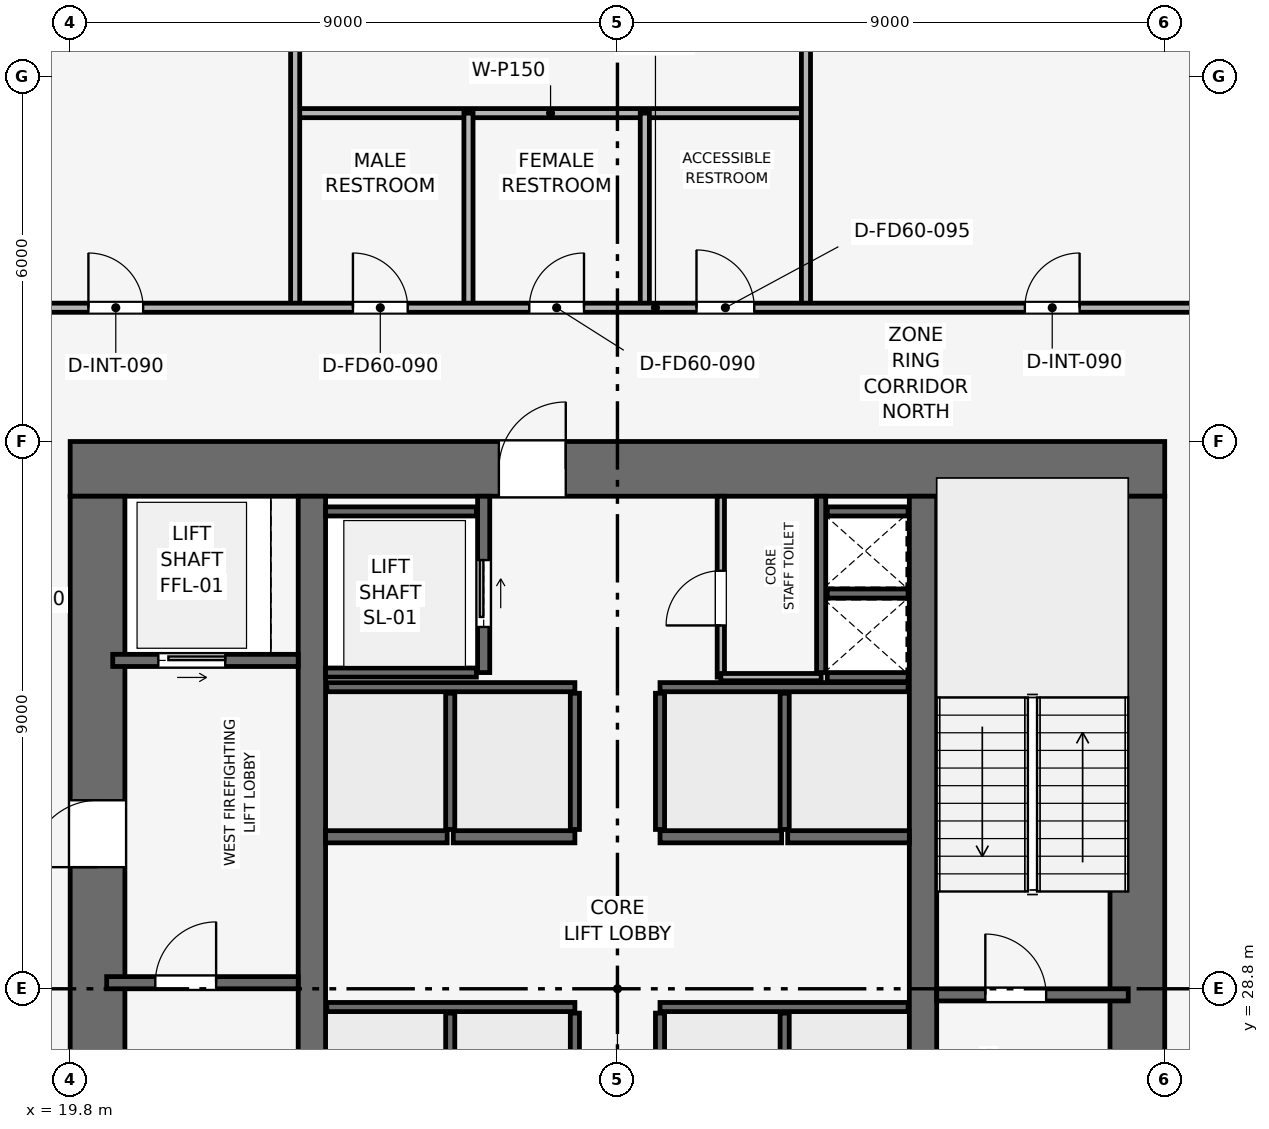
"""IFC4 building model, lengths in metres.
Left out: names, types, materials, properties, quantities, classifications, styles, units other than length and angle.
Written with IfcOpenShell. Run it as: python <this file> out.ifc"""

import sys

from ifc_helpers import new_model, si_unit, direction, frame, frame_2d, origin, place, context, subcontext, project, spatial, rectangle, extrude, element, fill, save


model = new_model("IFC4")
c1 = context("Model", 3, precision=1e-05, world=origin(), true_north=direction((0.0, 1.0)))
c2 = subcontext(c1, "Body", "Model", "MODEL_VIEW")
j1 = project(units=[si_unit("LENGTHUNIT", "METRE"), si_unit("PLANEANGLEUNIT", "RADIAN")], contexts=[c1])
p1 = place(None, origin())
s1 = spatial("IfcSite", under=j1, at=p1, CompositionType="ELEMENT")
p2 = place(p1, origin())
s2 = spatial("IfcBuilding", under=s1, at=p2, CompositionType="ELEMENT")
p3 = place(p2, frame((0.0, 0.0, 125.1)))
s3 = spatial("IfcBuildingStorey", under=s2, at=p3, CompositionType="ELEMENT", Elevation=125.1)
p4 = place(p3, frame((19.8, 37.35, 0.0), z_axis=(0.0, 0.0, 1.0), x_axis=(1.0, 0.0, 0.0)))
e1 = element("IfcWall", 1, at=p4, inside=s3, PredefinedType="SHEAR", context=c2, shape_type="SweptSolid", body=[
    extrude(rectangle(XDim=18.0, YDim=0.9, at=frame_2d((9.0, 0.0))), origin(), (0.0, 0.0, 1.0), 3.9),
])
p5 = place(p4, frame((7.05, 0.0, 0.0)))
e2 = element("IfcOpeningElement", 2, at=p5, cuts=e1, PredefinedType="OPENING", context=c2, shape_type="SweptSolid", body=[
    extrude(rectangle(XDim=1.1, YDim=2.15, at=frame_2d((0.55, 1.075))), frame((0.0, 0.46, 0.0), z_axis=(0.0, -1.0, 0.0), x_axis=(1.0, 0.0, 0.0)), (0.0, 0.0, 1.0), 0.92),
])
p6 = place(p3, frame((20.25, 20.7, 0.0), z_axis=(0.0, 0.0, 1.0), x_axis=(0.0, 1.0, 0.0)))
e3 = element("IfcWall", 3, at=p6, inside=s3, PredefinedType="SHEAR", context=c2, shape_type="SweptSolid", body=[
    extrude(rectangle(XDim=16.2, YDim=0.9, at=frame_2d((8.1, 0.0))), origin(), (0.0, 0.0, 1.0), 3.9),
])
p7 = place(p6, frame((10.1, 0.0, 0.0)))
e4 = element("IfcOpeningElement", 4, at=p7, cuts=e3, PredefinedType="OPENING", context=c2, shape_type="SweptSolid", body=[
    extrude(rectangle(XDim=1.1, YDim=2.15, at=frame_2d((0.55, 1.075))), frame((0.0, 0.46, 0.0), z_axis=(0.0, -1.0, 0.0), x_axis=(1.0, 0.0, 0.0)), (0.0, 0.0, 1.0), 0.92),
])
p8 = place(p3, frame((37.35, 20.7, 0.0), z_axis=(0.0, 0.0, 1.0), x_axis=(0.0, 1.0, 0.0)))
e5 = element("IfcWall", 5, at=p8, inside=s3, PredefinedType="SHEAR", context=c2, shape_type="SweptSolid", body=[
    extrude(rectangle(XDim=16.2, YDim=0.9, at=frame_2d((8.1, 0.0))), origin(), (0.0, 0.0, 1.0), 3.9),
])
p9 = place(p8, frame((4.6, 0.0, 0.0)))
e6 = element("IfcOpeningElement", 6, at=p9, cuts=e5, PredefinedType="OPENING", context=c2, shape_type="SweptSolid", body=[
    extrude(rectangle(XDim=1.1, YDim=2.15, at=frame_2d((0.55, 1.075))), frame((0.0, 0.46, 0.0), z_axis=(0.0, -1.0, 0.0), x_axis=(1.0, 0.0, 0.0)), (0.0, 0.0, 1.0), 0.92),
])
for number, where, z_axis, x_axis in (
    (7, (23.775, 20.7, 0.0), (0.0, 0.0, 1.0), (0.0, 1.0, 0.0)),
    (8, (33.825, 20.7, 0.0), (0.0, 0.0, 1.0), (0.0, 1.0, 0.0)),
):
    element("IfcWall", number, at=place(p3, frame(where, z_axis=z_axis, x_axis=x_axis)), inside=s3, PredefinedType="SHEAR", context=c2, shape_type="SweptSolid", body=[
        extrude(rectangle(XDim=16.2, YDim=0.45, at=frame_2d((8.1, 0.0))), origin(), (0.0, 0.0, 1.0), 3.9),
    ])
p10 = place(p3, frame((20.4, 28.9, 0.0), z_axis=(0.0, 0.0, 1.0), x_axis=(1.0, 0.0, 0.0)))
e9 = element("IfcWall", 9, at=p10, inside=s3, PredefinedType="SHEAR", context=c2, shape_type="SweptSolid", body=[
    extrude(rectangle(XDim=3.15, YDim=0.2, at=frame_2d((1.575, 0.0))), origin(), (0.0, 0.0, 1.0), 3.65),
])
p11 = place(p10, frame((0.8, 0.0, 0.0)))
e10 = element("IfcOpeningElement", 10, at=p11, cuts=e9, PredefinedType="OPENING", context=c2, shape_type="SweptSolid", body=[
    extrude(rectangle(XDim=1.0, YDim=2.1, at=frame_2d((0.5, 1.05))), frame((0.0, 0.11, 0.0), z_axis=(0.0, -1.0, 0.0), x_axis=(1.0, 0.0, 0.0)), (0.0, 0.0, 1.0), 0.22),
])
p12 = place(p3, frame((34.05, 28.7, 0.0), z_axis=(0.0, 0.0, 1.0), x_axis=(1.0, 0.0, 0.0)))
e11 = element("IfcWall", 11, at=p12, inside=s3, PredefinedType="SHEAR", context=c2, shape_type="SweptSolid", body=[
    extrude(rectangle(XDim=3.15, YDim=0.2, at=frame_2d((1.575, 0.0))), origin(), (0.0, 0.0, 1.0), 3.65),
])
p13 = place(p12, frame((0.8, 0.0, 0.0)))
e12 = element("IfcOpeningElement", 12, at=p13, cuts=e11, PredefinedType="OPENING", context=c2, shape_type="SweptSolid", body=[
    extrude(rectangle(XDim=1.0, YDim=2.1, at=frame_2d((0.5, 1.05))), frame((0.0, 0.11, 0.0), z_axis=(0.0, -1.0, 0.0), x_axis=(1.0, 0.0, 0.0)), (0.0, 0.0, 1.0), 0.22),
])
p14 = place(p3, frame((32.15, 34.0, 0.0), z_axis=(0.0, 0.0, 1.0), x_axis=(0.0, 1.0, 0.0)))
e13 = element("IfcWall", 13, at=p14, inside=s3, PredefinedType="SHEAR", context=c2, shape_type="SweptSolid", body=[
    extrude(rectangle(XDim=2.9, YDim=0.15, at=frame_2d((1.45, 0.0))), origin(), (0.0, 0.0, 1.0), 3.65),
])
for number, where, z_axis, x_axis in (
    (14, (32.25, 33.925, 0.0), (0.0, 0.0, 1.0), (1.0, 0.0, 0.0)),
    (15, (32.25, 35.3, 0.0), (0.0, 0.0, 1.0), (1.0, 0.0, 0.0)),
):
    element("IfcWall", number, at=place(p3, frame(where, z_axis=z_axis, x_axis=x_axis)), inside=s3, PredefinedType="SHEAR", context=c2, shape_type="SweptSolid", body=[
        extrude(rectangle(XDim=1.33, YDim=0.15, at=frame_2d((0.665, 0.0))), origin(), (0.0, 0.0, 1.0), 3.65),
    ])
p15 = place(p3, frame((20.5, 34.2, 0.0), z_axis=(0.0, 0.0, 1.0), x_axis=(1.0, 0.0, 0.0)))
e16 = element("IfcWall", 16, at=p15, inside=s3, PredefinedType="SHEAR", context=c2, shape_type="SweptSolid", body=[
    extrude(rectangle(XDim=3.05, YDim=0.2, at=frame_2d((1.525, 0.0))), origin(), (0.0, 0.0, 1.0), 3.65),
])
p16 = place(p15, frame((0.75, 0.0, 0.0)))
e17 = element("IfcOpeningElement", 17, at=p16, cuts=e16, PredefinedType="OPENING", context=c2, shape_type="SweptSolid", body=[
    extrude(rectangle(XDim=1.1, YDim=2.15, at=frame_2d((0.55, 1.075))), frame((0.0, 0.11, 0.0), z_axis=(0.0, -1.0, 0.0), x_axis=(1.0, 0.0, 0.0)), (0.0, 0.0, 1.0), 0.22),
])
p17 = place(p3, frame((26.6, 34.0, 0.0), z_axis=(0.0, 0.0, 1.0), x_axis=(0.0, 1.0, 0.0)))
e18 = element("IfcWall", 18, at=p17, inside=s3, PredefinedType="SHEAR", context=c2, shape_type="SweptSolid", body=[
    extrude(rectangle(XDim=2.9, YDim=0.2, at=frame_2d((1.45, 0.0))), origin(), (0.0, 0.0, 1.0), 3.65),
])
p18 = place(p17, frame((0.75, 0.0, 0.0)))
e19 = element("IfcOpeningElement", 19, at=p18, cuts=e18, PredefinedType="OPENING", context=c2, shape_type="SweptSolid", body=[
    extrude(rectangle(XDim=1.1, YDim=2.15, at=frame_2d((0.55, 1.075))), frame((0.0, 0.11, 0.0), z_axis=(0.0, -1.0, 0.0), x_axis=(1.0, 0.0, 0.0)), (0.0, 0.0, 1.0), 0.22),
])
for number, where, z_axis, x_axis in (
    (20, (24.0, 34.0, 0.0), (0.0, 0.0, 1.0), (1.0, 0.0, 0.0)),
    (21, (24.0, 36.65, 0.0), (0.0, 0.0, 1.0), (1.0, 0.0, 0.0)),
):
    element("IfcWall", number, at=place(p3, frame(where, z_axis=z_axis, x_axis=x_axis)), inside=s3, PredefinedType="SHEAR", context=c2, shape_type="SweptSolid", body=[
        extrude(rectangle(XDim=2.48, YDim=0.15, at=frame_2d((1.24, 0.0))), origin(), (0.0, 0.0, 1.0), 3.65),
    ])
for number, where, z_axis, x_axis in (
    (22, (24.0, 31.3, 0.0), (0.0, 0.0, 1.0), (1.0, 0.0, 0.0)),
    (23, (26.1, 31.3, 0.0), (0.0, 0.0, 1.0), (1.0, 0.0, 0.0)),
    (24, (29.5, 31.3, 0.0), (0.0, 0.0, 1.0), (1.0, 0.0, 0.0)),
    (25, (31.6, 31.3, 0.0), (0.0, 0.0, 1.0), (1.0, 0.0, 0.0)),
):
    element("IfcWall", number, at=place(p3, frame(where, z_axis=z_axis, x_axis=x_axis)), inside=s3, PredefinedType="SHEAR", context=c2, shape_type="SweptSolid", body=[
        extrude(rectangle(XDim=2.0, YDim=0.2, at=frame_2d((1.0, 0.0))), origin(), (0.0, 0.0, 1.0), 3.65),
    ])
p19 = place(p3, frame((32.25, 36.65, 0.0), z_axis=(0.0, 0.0, 1.0), x_axis=(1.0, 0.0, 0.0)))
e26 = element("IfcWall", 26, at=p19, inside=s3, PredefinedType="SHEAR", context=c2, shape_type="SweptSolid", body=[
    extrude(rectangle(XDim=1.33, YDim=0.15, at=frame_2d((0.665, 0.0))), origin(), (0.0, 0.0, 1.0), 3.65),
])
for number, where, z_axis, x_axis in (
    (27, (24.02, 28.5, 0.0), (0.0, 0.0, 1.0), (1.0, 0.0, 0.0)),
    (28, (29.5, 28.5, 0.0), (0.0, 0.0, 1.0), (1.0, 0.0, 0.0)),
):
    element("IfcWall", number, at=place(p3, frame(where, z_axis=z_axis, x_axis=x_axis)), inside=s3, PredefinedType="SHEAR", context=c2, shape_type="SweptSolid", body=[
        extrude(rectangle(XDim=4.08, YDim=0.15, at=frame_2d((2.04, 0.0))), origin(), (0.0, 0.0, 1.0), 3.65),
    ])
for number, where, z_axis, x_axis in (
    (29, (26.05, 26.12, 0.0), (0.0, 0.0, 1.0), (0.0, 1.0, 0.0)),
    (30, (28.1, 26.12, 0.0), (0.0, 0.0, 1.0), (0.0, 1.0, 0.0)),
    (31, (29.5, 26.12, 0.0), (0.0, 0.0, 1.0), (0.0, 1.0, 0.0)),
    (32, (31.55, 26.12, 0.0), (0.0, 0.0, 1.0), (0.0, 1.0, 0.0)),
):
    element("IfcWall", number, at=place(p3, frame(where, z_axis=z_axis, x_axis=x_axis)), inside=s3, PredefinedType="SHEAR", context=c2, shape_type="SweptSolid", body=[
        extrude(rectangle(XDim=2.28, YDim=0.15, at=frame_2d((1.14, 0.0))), origin(), (0.0, 0.0, 1.0), 3.65),
    ])
for number, where, z_axis, x_axis in (
    (33, (24.02, 33.76, 0.0), (0.0, 0.0, 1.0), (1.0, 0.0, 0.0)),
    (34, (29.5, 33.76, 0.0), (0.0, 0.0, 1.0), (1.0, 0.0, 0.0)),
):
    element("IfcWall", number, at=place(p3, frame(where, z_axis=z_axis, x_axis=x_axis)), inside=s3, PredefinedType="SHEAR", context=c2, shape_type="SweptSolid", body=[
        extrude(rectangle(XDim=4.08, YDim=0.15, at=frame_2d((2.04, 0.0))), origin(), (0.0, 0.0, 1.0), 3.65),
    ])
for number, where, z_axis, x_axis in (
    (35, (26.05, 31.42, 0.0), (0.0, 0.0, 1.0), (0.0, 1.0, 0.0)),
    (36, (28.1, 31.42, 0.0), (0.0, 0.0, 1.0), (0.0, 1.0, 0.0)),
    (37, (29.5, 31.42, 0.0), (0.0, 0.0, 1.0), (0.0, 1.0, 0.0)),
    (38, (31.55, 31.42, 0.0), (0.0, 0.0, 1.0), (0.0, 1.0, 0.0)),
):
    element("IfcWall", number, at=place(p3, frame(where, z_axis=z_axis, x_axis=x_axis)), inside=s3, PredefinedType="SHEAR", context=c2, shape_type="SweptSolid", body=[
        extrude(rectangle(XDim=2.24, YDim=0.15, at=frame_2d((1.12, 0.0))), origin(), (0.0, 0.0, 1.0), 3.65),
    ])
p20 = place(p3, frame((30.5, 33.925, 0.0), z_axis=(0.0, 0.0, 1.0), x_axis=(0.0, 1.0, 0.0)))
e39 = element("IfcWall", 39, at=p20, inside=s3, PredefinedType="PARTITIONING", context=c2, shape_type="SweptSolid", body=[
    extrude(rectangle(XDim=2.975, YDim=0.12, at=frame_2d((1.487, 0.0))), origin(), (0.0, 0.0, 1.0), 3.65),
])
p21 = place(p20, frame((0.85, 0.0, 0.0)))
e40 = element("IfcOpeningElement", 40, at=p21, cuts=e39, PredefinedType="OPENING", context=c2, shape_type="SweptSolid", body=[
    extrude(rectangle(XDim=0.9, YDim=2.1, at=frame_2d((0.45, 1.05))), frame((0.0, 0.07, 0.0), z_axis=(0.0, -1.0, 0.0), x_axis=(1.0, 0.0, 0.0)), (0.0, 0.0, 1.0), 0.14),
])
p22 = place(p3, frame((30.5, 33.925, 0.0), z_axis=(0.0, 0.0, 1.0), x_axis=(1.0, 0.0, 0.0)))
e41 = element("IfcWall", 41, at=p22, inside=s3, PredefinedType="PARTITIONING", context=c2, shape_type="SweptSolid", body=[
    extrude(rectangle(XDim=1.65, YDim=0.12, at=frame_2d((0.825, 0.0))), origin(), (0.0, 0.0, 1.0), 3.65),
])
p23 = place(p3, frame((23.5, 43.2, 0.0), z_axis=(0.0, 0.0, 1.0), x_axis=(1.0, 0.0, 0.0)))
e42 = element("IfcWall", 42, at=p23, inside=s3, PredefinedType="PARTITIONING", context=c2, shape_type="SweptSolid", body=[
    extrude(rectangle(XDim=8.4, YDim=0.15, at=frame_2d((4.2, 0.0))), origin(), (0.0, 0.0, 1.0), 3.185),
])
p24 = place(p3, frame((23.5, 40.0, 0.0), z_axis=(0.0, 0.0, 1.0), x_axis=(0.0, 1.0, 0.0)))
e43 = element("IfcWall", 43, at=p24, inside=s3, PredefinedType="PARTITIONING", context=c2, shape_type="SweptSolid", body=[
    extrude(rectangle(XDim=14.77, YDim=0.15, at=frame_2d((7.385, 0.0))), origin(), (0.0, 0.0, 1.0), 3.035),
])
p25 = place(p24, frame((8.535, 0.0, 0.0)))
e44 = element("IfcOpeningElement", 44, at=p25, cuts=e43, PredefinedType="OPENING", context=c2, shape_type="SweptSolid", body=[
    extrude(rectangle(XDim=0.9, YDim=2.1, at=frame_2d((0.45, 1.05))), frame((0.0, 0.085, 0.0), z_axis=(0.0, -1.0, 0.0), x_axis=(1.0, 0.0, 0.0)), (0.0, 0.0, 1.0), 0.17),
])
p26 = place(p3, frame((31.9, 40.0, 0.0), z_axis=(0.0, 0.0, 1.0), x_axis=(0.0, 1.0, 0.0)))
e45 = element("IfcWall", 45, at=p26, inside=s3, PredefinedType="PARTITIONING", context=c2, shape_type="SweptSolid", body=[
    extrude(rectangle(XDim=14.77, YDim=0.15, at=frame_2d((7.385, 0.0))), origin(), (0.0, 0.0, 1.0), 3.035),
])
for number, where, z_axis, x_axis in (
    (46, (26.35, 40.0, 0.0), (0.0, 0.0, 1.0), (0.0, 1.0, 0.0)),
    (47, (29.25, 40.0, 0.0), (0.0, 0.0, 1.0), (0.0, 1.0, 0.0)),
):
    element("IfcWall", number, at=place(p3, frame(where, z_axis=z_axis, x_axis=x_axis)), inside=s3, PredefinedType="PARTITIONING", context=c2, shape_type="SweptSolid", body=[
        extrude(rectangle(XDim=3.2, YDim=0.15, at=frame_2d((1.6, 0.0))), origin(), (0.0, 0.0, 1.0), 3.65),
    ])
p27 = place(p3, frame((17.6, 40.0, 0.0), z_axis=(0.0, 0.0, 1.0), x_axis=(1.0, 0.0, 0.0)))
e48 = element("IfcWall", 48, at=p27, inside=s3, PredefinedType="PARTITIONING", context=c2, shape_type="SweptSolid", body=[
    extrude(rectangle(XDim=22.4, YDim=0.15, at=frame_2d((11.2, 0.0))), origin(), (0.0, 0.0, 1.0), 3.185),
])
p28 = place(p27, frame((2.5, 0.0, 0.0)))
e49 = element("IfcOpeningElement", 49, at=p28, cuts=e48, PredefinedType="OPENING", context=c2, shape_type="SweptSolid", body=[
    extrude(rectangle(XDim=0.9, YDim=2.1, at=frame_2d((0.45, 1.05))), frame((0.0, 0.085, 0.0), z_axis=(0.0, -1.0, 0.0), x_axis=(1.0, 0.0, 0.0)), (0.0, 0.0, 1.0), 0.17),
])
p29 = place(p27, frame((6.85, 0.0, 0.0)))
e50 = element("IfcOpeningElement", 50, at=p29, cuts=e48, PredefinedType="OPENING", context=c2, shape_type="SweptSolid", body=[
    extrude(rectangle(XDim=0.9, YDim=2.1, at=frame_2d((0.45, 1.05))), frame((0.0, 0.085, 0.0), z_axis=(0.0, -1.0, 0.0), x_axis=(1.0, 0.0, 0.0)), (0.0, 0.0, 1.0), 0.17),
])
p30 = place(p27, frame((9.75, 0.0, 0.0)))
e51 = element("IfcOpeningElement", 51, at=p30, cuts=e48, PredefinedType="OPENING", context=c2, shape_type="SweptSolid", body=[
    extrude(rectangle(XDim=0.9, YDim=2.1, at=frame_2d((0.45, 1.05))), frame((0.0, 0.085, 0.0), z_axis=(0.0, -1.0, 0.0), x_axis=(1.0, 0.0, 0.0)), (0.0, 0.0, 1.0), 0.17),
])
p31 = place(p27, frame((12.5, 0.0, 0.0)))
e52 = element("IfcOpeningElement", 52, at=p31, cuts=e48, PredefinedType="OPENING", context=c2, shape_type="SweptSolid", body=[
    extrude(rectangle(XDim=0.95, YDim=2.1, at=frame_2d((0.475, 1.05))), frame((0.0, 0.085, 0.0), z_axis=(0.0, -1.0, 0.0), x_axis=(1.0, 0.0, 0.0)), (0.0, 0.0, 1.0), 0.17),
])
p32 = place(p27, frame((17.9, 0.0, 0.0)))
e53 = element("IfcOpeningElement", 53, at=p32, cuts=e48, PredefinedType="OPENING", context=c2, shape_type="SweptSolid", body=[
    extrude(rectangle(XDim=0.9, YDim=2.1, at=frame_2d((0.45, 1.05))), frame((0.0, 0.085, 0.0), z_axis=(0.0, -1.0, 0.0), x_axis=(1.0, 0.0, 0.0)), (0.0, 0.0, 1.0), 0.17),
])
p33 = place(p11, origin())
e54 = element("IfcDoor", 54, at=p33, inside=s3, OperationType="SINGLE_SWING_RIGHT", PredefinedType="DOOR", context=c2, shape_type="SweptSolid", body=[
    extrude(rectangle(XDim=1.0, YDim=2.1, at=frame_2d((0.5, 1.05))), frame((0.0, 0.025, 0.0), z_axis=(0.0, -1.0, 0.0), x_axis=(1.0, 0.0, 0.0)), (0.0, 0.0, 1.0), 0.05),
])
fill(e10, e54)
p34 = place(p13, origin())
e55 = element("IfcDoor", 55, at=p34, inside=s3, OperationType="SINGLE_SWING_LEFT", PredefinedType="DOOR", context=c2, shape_type="SweptSolid", body=[
    extrude(rectangle(XDim=1.0, YDim=2.1, at=frame_2d((0.5, 1.05))), frame((0.0, 0.025, 0.0), z_axis=(0.0, -1.0, 0.0), x_axis=(1.0, 0.0, 0.0)), (0.0, 0.0, 1.0), 0.05),
])
fill(e12, e55)
p35 = place(p16, origin())
e56 = element("IfcDoor", 56, at=p35, inside=s3, OperationType="SLIDING_TO_RIGHT", PredefinedType="DOOR", context=c2, shape_type="SweptSolid", body=[
    extrude(rectangle(XDim=1.1, YDim=2.15, at=frame_2d((0.55, 1.075))), frame((0.0, 0.025, 0.0), z_axis=(0.0, -1.0, 0.0), x_axis=(1.0, 0.0, 0.0)), (0.0, 0.0, 1.0), 0.05),
])
fill(e17, e56)
p36 = place(p18, origin())
e57 = element("IfcDoor", 57, at=p36, inside=s3, OperationType="SLIDING_TO_RIGHT", PredefinedType="DOOR", context=c2, shape_type="SweptSolid", body=[
    extrude(rectangle(XDim=1.1, YDim=2.15, at=frame_2d((0.55, 1.075))), frame((0.0, 0.025, 0.0), z_axis=(0.0, -1.0, 0.0), x_axis=(1.0, 0.0, 0.0)), (0.0, 0.0, 1.0), 0.05),
])
fill(e19, e57)
p37 = place(p21, origin())
e58 = element("IfcDoor", 58, at=p37, inside=s3, OperationType="SINGLE_SWING_LEFT", PredefinedType="DOOR", context=c2, shape_type="SweptSolid", body=[
    extrude(rectangle(XDim=0.9, YDim=2.1, at=frame_2d((0.45, 1.05))), frame((0.0, 0.025, 0.0), z_axis=(0.0, -1.0, 0.0), x_axis=(1.0, 0.0, 0.0)), (0.0, 0.0, 1.0), 0.05),
])
fill(e40, e58)
p38 = place(p28, origin())
e59 = element("IfcDoor", 59, at=p38, inside=s3, OperationType="SINGLE_SWING_LEFT", PredefinedType="DOOR", context=c2, shape_type="SweptSolid", body=[
    extrude(rectangle(XDim=0.9, YDim=2.1, at=frame_2d((0.45, 1.05))), frame((0.0, 0.025, 0.0), z_axis=(0.0, -1.0, 0.0), x_axis=(1.0, 0.0, 0.0)), (0.0, 0.0, 1.0), 0.05),
])
fill(e49, e59)
p39 = place(p29, origin())
e60 = element("IfcDoor", 60, at=p39, inside=s3, OperationType="SINGLE_SWING_LEFT", PredefinedType="DOOR", context=c2, shape_type="SweptSolid", body=[
    extrude(rectangle(XDim=0.9, YDim=2.1, at=frame_2d((0.45, 1.05))), frame((0.0, 0.025, 0.0), z_axis=(0.0, -1.0, 0.0), x_axis=(1.0, 0.0, 0.0)), (0.0, 0.0, 1.0), 0.05),
])
fill(e50, e60)
p40 = place(p30, origin())
e61 = element("IfcDoor", 61, at=p40, inside=s3, OperationType="SINGLE_SWING_RIGHT", PredefinedType="DOOR", context=c2, shape_type="SweptSolid", body=[
    extrude(rectangle(XDim=0.9, YDim=2.1, at=frame_2d((0.45, 1.05))), frame((0.0, 0.025, 0.0), z_axis=(0.0, -1.0, 0.0), x_axis=(1.0, 0.0, 0.0)), (0.0, 0.0, 1.0), 0.05),
])
fill(e51, e61)
p41 = place(p31, origin())
e62 = element("IfcDoor", 62, at=p41, inside=s3, OperationType="SINGLE_SWING_LEFT", PredefinedType="DOOR", context=c2, shape_type="SweptSolid", body=[
    extrude(rectangle(XDim=0.95, YDim=2.1, at=frame_2d((0.475, 1.05))), frame((0.0, 0.025, 0.0), z_axis=(0.0, -1.0, 0.0), x_axis=(1.0, 0.0, 0.0)), (0.0, 0.0, 1.0), 0.05),
])
fill(e52, e62)
p42 = place(p32, origin())
e63 = element("IfcDoor", 63, at=p42, inside=s3, OperationType="SINGLE_SWING_RIGHT", PredefinedType="DOOR", context=c2, shape_type="SweptSolid", body=[
    extrude(rectangle(XDim=0.9, YDim=2.1, at=frame_2d((0.45, 1.05))), frame((0.0, 0.025, 0.0), z_axis=(0.0, -1.0, 0.0), x_axis=(1.0, 0.0, 0.0)), (0.0, 0.0, 1.0), 0.05),
])
fill(e53, e63)
p43 = place(p7, origin())
e64 = element("IfcDoor", 64, at=p43, inside=s3, OperationType="SINGLE_SWING_LEFT", PredefinedType="DOOR", context=c2, shape_type="SweptSolid", body=[
    extrude(rectangle(XDim=1.1, YDim=2.15, at=frame_2d((0.55, 1.075))), frame((0.0, 0.025, 0.0), z_axis=(0.0, -1.0, 0.0), x_axis=(1.0, 0.0, 0.0)), (0.0, 0.0, 1.0), 0.05),
])
fill(e4, e64)
p44 = place(p5, origin())
e65 = element("IfcDoor", 65, at=p44, inside=s3, OperationType="SINGLE_SWING_RIGHT", PredefinedType="DOOR", context=c2, shape_type="SweptSolid", body=[
    extrude(rectangle(XDim=1.1, YDim=2.15, at=frame_2d((0.55, 1.075))), frame((0.0, 0.025, 0.0), z_axis=(0.0, -1.0, 0.0), x_axis=(1.0, 0.0, 0.0)), (0.0, 0.0, 1.0), 0.05),
])
fill(e2, e65)
save(model, sys.argv[1])
